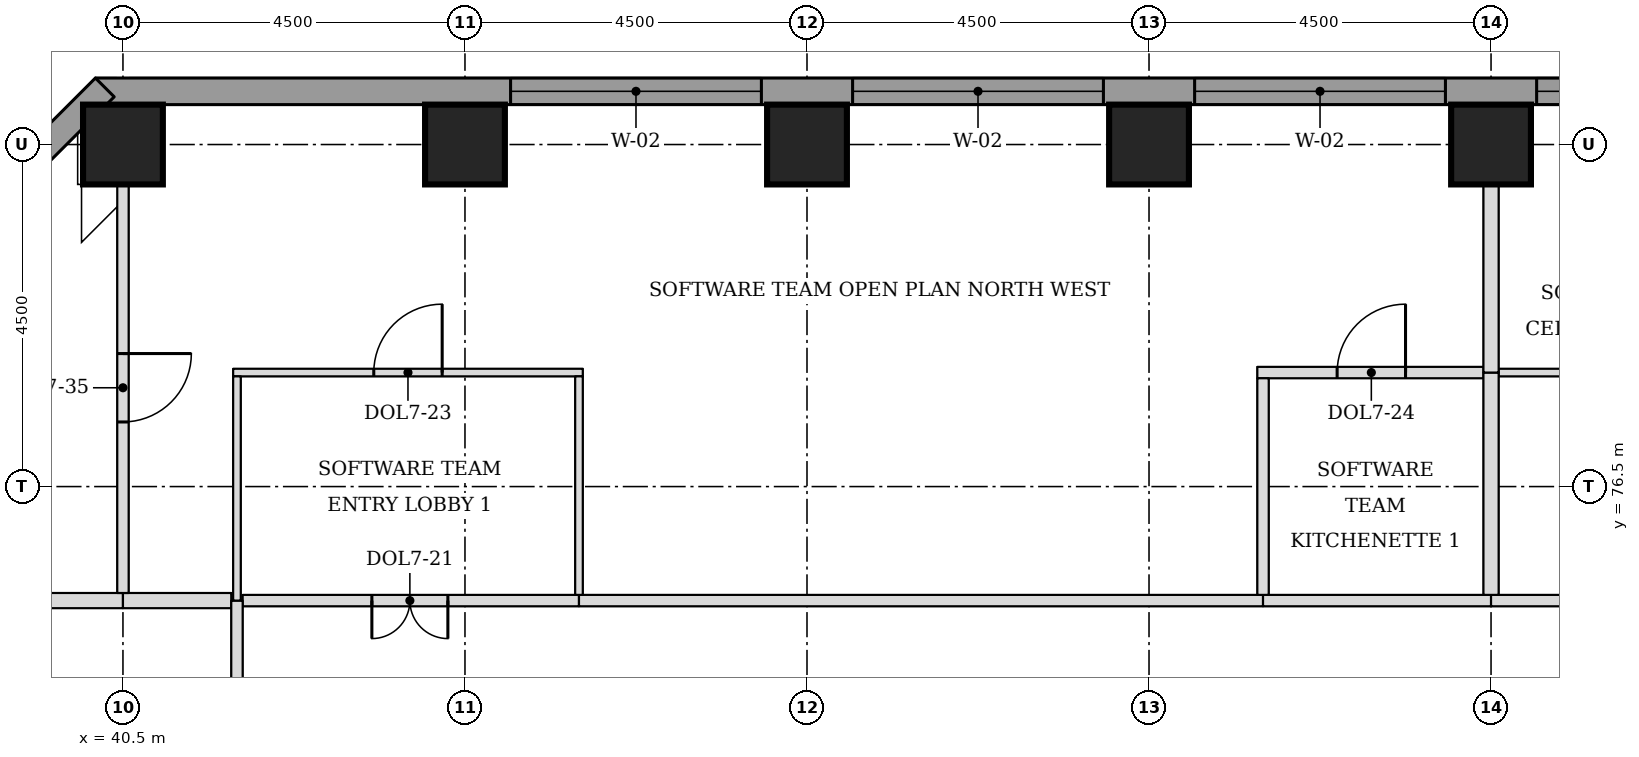
"""IFC4 building model, lengths in metres.
Left out: names, types, materials, properties, quantities, classifications, styles, units other than length and angle.
Written with IfcOpenShell. Run it as: python <this file> out.ifc"""

import sys

from ifc_helpers import new_model, si_unit, direction, frame, frame_2d, origin, origin_2d, place, context, subcontext, project, spatial, rectangle, extrude, element, fill, save


model = new_model("IFC4")
c1 = context("Model", 3, precision=1e-05, world=origin(), true_north=direction((0.0, 1.0)))
c2 = subcontext(c1, "Body", "Model", "MODEL_VIEW")
j1 = project(units=[si_unit("LENGTHUNIT", "METRE"), si_unit("PLANEANGLEUNIT", "RADIAN")], contexts=[c1])
p1 = place(None, origin())
s1 = spatial("IfcSite", under=j1, at=p1, CompositionType="ELEMENT")
p2 = place(p1, origin())
s2 = spatial("IfcBuilding", under=s1, at=p2, CompositionType="ELEMENT")
p3 = place(p2, frame((0.0, 0.0, 127.0)))
s3 = spatial("IfcBuildingStorey", under=s2, at=p3, CompositionType="ELEMENT", Elevation=127.0)
for number, where, z_axis, x_axis in (
    (1, (40.5, 81.0, 0.0), (0.0, 0.0, 1.0), (1.0, 0.0, 0.0)),
    (2, (45.0, 81.0, 0.0), (0.0, 0.0, 1.0), (1.0, 0.0, 0.0)),
    (3, (49.5, 81.0, 0.0), (0.0, 0.0, 1.0), (1.0, 0.0, 0.0)),
    (4, (54.0, 81.0, 0.0), (0.0, 0.0, 1.0), (1.0, 0.0, 0.0)),
    (5, (58.5, 81.0, 0.0), (0.0, 0.0, 1.0), (1.0, 0.0, 0.0)),
):
    element("IfcColumn", number, at=place(p3, frame(where, z_axis=z_axis, x_axis=x_axis)), inside=s3, PredefinedType="COLUMN", context=c2, shape_type="SweptSolid", body=[
        extrude(rectangle(XDim=1.05, YDim=1.05, at=origin_2d()), origin(), (0.0, 0.0, 1.0), 3.7),
    ])
p4 = place(p3, frame((72.362, 81.7, 0.0), z_axis=(0.0, 0.0, 1.0), x_axis=(-1.0, 0.0, 0.0)))
e6 = element("IfcWall", 6, at=p4, inside=s3, PredefinedType="STANDARD", context=c2, shape_type="SweptSolid", body=[
    extrude(rectangle(XDim=32.225, YDim=0.35, at=frame_2d((16.112, 0.0))), origin(), (0.0, 0.0, 1.0), 3.525),
])
p5 = place(p4, frame((5.462, 0.0, 0.9)))
e7 = element("IfcOpeningElement", 7, at=p5, cuts=e6, PredefinedType="OPENING", context=c2, shape_type="SweptSolid", body=[
    extrude(rectangle(XDim=3.3, YDim=1.9, at=frame_2d((1.65, 0.95))), frame((0.0, 0.185, 0.0), z_axis=(0.0, -1.0, 0.0), x_axis=(1.0, 0.0, 0.0)), (0.0, 0.0, 1.0), 0.37),
])
p6 = place(p4, frame((9.962, 0.0, 0.9)))
e8 = element("IfcOpeningElement", 8, at=p6, cuts=e6, PredefinedType="OPENING", context=c2, shape_type="SweptSolid", body=[
    extrude(rectangle(XDim=3.3, YDim=1.9, at=frame_2d((1.65, 0.95))), frame((0.0, 0.185, 0.0), z_axis=(0.0, -1.0, 0.0), x_axis=(1.0, 0.0, 0.0)), (0.0, 0.0, 1.0), 0.37),
])
p7 = place(p4, frame((14.462, 0.0, 0.9)))
e9 = element("IfcOpeningElement", 9, at=p7, cuts=e6, PredefinedType="OPENING", context=c2, shape_type="SweptSolid", body=[
    extrude(rectangle(XDim=3.3, YDim=1.9, at=frame_2d((1.65, 0.95))), frame((0.0, 0.185, 0.0), z_axis=(0.0, -1.0, 0.0), x_axis=(1.0, 0.0, 0.0)), (0.0, 0.0, 1.0), 0.37),
])
p8 = place(p4, frame((18.962, 0.0, 0.9)))
e10 = element("IfcOpeningElement", 10, at=p8, cuts=e6, PredefinedType="OPENING", context=c2, shape_type="SweptSolid", body=[
    extrude(rectangle(XDim=3.3, YDim=1.9, at=frame_2d((1.65, 0.95))), frame((0.0, 0.185, 0.0), z_axis=(0.0, -1.0, 0.0), x_axis=(1.0, 0.0, 0.0)), (0.0, 0.0, 1.0), 0.37),
])
p9 = place(p4, frame((23.462, 0.0, 0.9)))
e11 = element("IfcOpeningElement", 11, at=p9, cuts=e6, PredefinedType="OPENING", context=c2, shape_type="SweptSolid", body=[
    extrude(rectangle(XDim=3.3, YDim=1.9, at=frame_2d((1.65, 0.95))), frame((0.0, 0.185, 0.0), z_axis=(0.0, -1.0, 0.0), x_axis=(1.0, 0.0, 0.0)), (0.0, 0.0, 1.0), 0.37),
])
p10 = place(p3, frame((40.261, 81.751, 0.0), z_axis=(0.0, 0.0, 1.0), x_axis=(-0.707106781187, -0.707106781187, 0.0)))
e12 = element("IfcWall", 12, at=p10, inside=s3, PredefinedType="STANDARD", context=c2, shape_type="SweptSolid", body=[
    extrude(rectangle(XDim=7.089, YDim=0.35, at=frame_2d((3.544, 0.0))), origin(), (0.0, 0.0, 1.0), 3.525),
])
p11 = place(p10, frame((1.894, 0.0, 0.9)))
e13 = element("IfcOpeningElement", 13, at=p11, cuts=e12, PredefinedType="OPENING", context=c2, shape_type="SweptSolid", body=[
    extrude(rectangle(XDim=3.3, YDim=1.9, at=frame_2d((1.65, 0.95))), frame((0.0, 0.185, 0.0), z_axis=(0.0, -1.0, 0.0), x_axis=(1.0, 0.0, 0.0)), (0.0, 0.0, 1.0), 0.37),
])
p12 = place(p3, frame((35.475, 75.0, 0.0), z_axis=(0.0, 0.0, 1.0), x_axis=(1.0, 0.0, 0.0)))
e14 = element("IfcWall", 14, at=p12, inside=s3, PredefinedType="PARTITIONING", context=c2, shape_type="SweptSolid", body=[
    extrude(rectangle(XDim=5.025, YDim=0.2, at=frame_2d((2.512, 0.0))), origin(), (0.0, 0.0, 1.0), 3.55),
])
p13 = place(p3, frame((40.5, 75.0, 0.0), z_axis=(0.0, 0.0, 1.0), x_axis=(1.0, 0.0, 0.0)))
e15 = element("IfcWall", 15, at=p13, inside=s3, PredefinedType="PARTITIONING", context=c2, shape_type="SweptSolid", body=[
    extrude(rectangle(XDim=1.425, YDim=0.2, at=frame_2d((0.712, 0.0))), origin(), (0.0, 0.0, 1.0), 3.55),
])
p14 = place(p3, frame((42.075, 75.0, 0.0), z_axis=(0.0, 0.0, 1.0), x_axis=(1.0, 0.0, 0.0)))
e16 = element("IfcWall", 16, at=p14, inside=s3, PredefinedType="PARTITIONING", context=c2, shape_type="SweptSolid", body=[
    extrude(rectangle(XDim=4.425, YDim=0.15, at=frame_2d((2.212, 0.0))), origin(), (0.0, 0.0, 1.0), 3.55),
])
p15 = place(p14, frame((1.7, 0.0, 0.0)))
e17 = element("IfcOpeningElement", 17, at=p15, cuts=e16, PredefinedType="OPENING", context=c2, shape_type="SweptSolid", body=[
    extrude(rectangle(XDim=1.0, YDim=2.1, at=frame_2d((0.5, 1.05))), frame((0.0, 0.085, 0.0), z_axis=(0.0, -1.0, 0.0), x_axis=(1.0, 0.0, 0.0)), (0.0, 0.0, 1.0), 0.17),
])
p16 = place(p3, frame((46.5, 75.0, 0.0), z_axis=(0.0, 0.0, 1.0), x_axis=(1.0, 0.0, 0.0)))
e18 = element("IfcWall", 18, at=p16, inside=s3, PredefinedType="PARTITIONING", context=c2, shape_type="SweptSolid", body=[
    extrude(rectangle(XDim=9.0, YDim=0.15, at=frame_2d((4.5, 0.0))), origin(), (0.0, 0.0, 1.0), 3.55),
])
p17 = place(p3, frame((55.5, 75.0, 0.0), z_axis=(0.0, 0.0, 1.0), x_axis=(1.0, 0.0, 0.0)))
e19 = element("IfcWall", 19, at=p17, inside=s3, PredefinedType="PARTITIONING", context=c2, shape_type="SweptSolid", body=[
    extrude(rectangle(XDim=3.0, YDim=0.15, at=frame_2d((1.5, 0.0))), origin(), (0.0, 0.0, 1.0), 3.55),
])
p18 = place(p3, frame((58.5, 75.0, 0.0), z_axis=(0.0, 0.0, 1.0), x_axis=(1.0, 0.0, 0.0)))
e20 = element("IfcWall", 20, at=p18, inside=s3, PredefinedType="PARTITIONING", context=c2, shape_type="SweptSolid", body=[
    extrude(rectangle(XDim=12.0, YDim=0.15, at=frame_2d((6.0, 0.0))), origin(), (0.0, 0.0, 1.0), 3.55),
])
p19 = place(p18, frame((5.5, 0.0, 0.0)))
e21 = element("IfcOpeningElement", 21, at=p19, cuts=e20, PredefinedType="OPENING", context=c2, shape_type="SweptSolid", body=[
    extrude(rectangle(XDim=1.0, YDim=2.1, at=frame_2d((0.5, 1.05))), frame((0.0, 0.085, 0.0), z_axis=(0.0, -1.0, 0.0), x_axis=(1.0, 0.0, 0.0)), (0.0, 0.0, 1.0), 0.17),
])
p20 = place(p3, frame((41.95, 78.0, 0.0), z_axis=(0.0, 0.0, 1.0), x_axis=(1.0, 0.0, 0.0)))
e22 = element("IfcWall", 22, at=p20, inside=s3, PredefinedType="PARTITIONING", context=c2, shape_type="SweptSolid", body=[
    extrude(rectangle(XDim=4.6, YDim=0.1, at=frame_2d((2.3, 0.0))), origin(), (0.0, 0.0, 1.0), 3.55),
])
p21 = place(p20, frame((1.85, 0.0, 0.0)))
e23 = element("IfcOpeningElement", 23, at=p21, cuts=e22, PredefinedType="OPENING", context=c2, shape_type="SweptSolid", body=[
    extrude(rectangle(XDim=0.9, YDim=2.1, at=frame_2d((0.45, 1.05))), frame((0.0, 0.06, 0.0), z_axis=(0.0, -1.0, 0.0), x_axis=(1.0, 0.0, 0.0)), (0.0, 0.0, 1.0), 0.12),
])
p22 = place(p3, frame((55.425, 78.0, 0.0), z_axis=(0.0, 0.0, 1.0), x_axis=(1.0, 0.0, 0.0)))
e24 = element("IfcWall", 24, at=p22, inside=s3, PredefinedType="PARTITIONING", context=c2, shape_type="SweptSolid", body=[
    extrude(rectangle(XDim=2.975, YDim=0.15, at=frame_2d((1.487, 0.0))), origin(), (0.0, 0.0, 1.0), 3.55),
])
p23 = place(p22, frame((1.05, 0.0, 0.0)))
e25 = element("IfcOpeningElement", 25, at=p23, cuts=e24, PredefinedType="OPENING", context=c2, shape_type="SweptSolid", body=[
    extrude(rectangle(XDim=0.9, YDim=2.1, at=frame_2d((0.45, 1.05))), frame((0.0, 0.085, 0.0), z_axis=(0.0, -1.0, 0.0), x_axis=(1.0, 0.0, 0.0)), (0.0, 0.0, 1.0), 0.17),
])
p24 = place(p3, frame((58.6, 78.0, 0.0), z_axis=(0.0, 0.0, 1.0), x_axis=(1.0, 0.0, 0.0)))
e26 = element("IfcWall", 26, at=p24, inside=s3, PredefinedType="PARTITIONING", context=c2, shape_type="SweptSolid", body=[
    extrude(rectangle(XDim=4.45, YDim=0.1, at=frame_2d((2.225, 0.0))), origin(), (0.0, 0.0, 1.0), 3.55),
])
p25 = place(p3, frame((42.0, 57.075, 0.0), z_axis=(0.0, 0.0, 1.0), x_axis=(0.0, 1.0, 0.0)))
e27 = element("IfcWall", 27, at=p25, inside=s3, PredefinedType="PARTITIONING", context=c2, shape_type="SweptSolid", body=[
    extrude(rectangle(XDim=17.925, YDim=0.15, at=frame_2d((8.962, 0.0))), origin(), (0.0, 0.0, 1.0), 3.55),
])
p26 = place(p3, frame((42.0, 75.0, 0.0), z_axis=(0.0, 0.0, 1.0), x_axis=(0.0, 1.0, 0.0)))
e28 = element("IfcWall", 28, at=p26, inside=s3, PredefinedType="PARTITIONING", context=c2, shape_type="SweptSolid", body=[
    extrude(rectangle(XDim=2.95, YDim=0.1, at=frame_2d((1.475, 0.0))), origin(), (0.0, 0.0, 1.0), 3.55),
])
p27 = place(p3, frame((46.5, 75.075, 0.0), z_axis=(0.0, 0.0, 1.0), x_axis=(0.0, 1.0, 0.0)))
e29 = element("IfcWall", 29, at=p27, inside=s3, PredefinedType="PARTITIONING", context=c2, shape_type="SweptSolid", body=[
    extrude(rectangle(XDim=2.875, YDim=0.1, at=frame_2d((1.438, 0.0))), origin(), (0.0, 0.0, 1.0), 3.022),
])
p28 = place(p3, frame((55.5, 75.075, 0.0), z_axis=(0.0, 0.0, 1.0), x_axis=(0.0, 1.0, 0.0)))
e30 = element("IfcWall", 30, at=p28, inside=s3, PredefinedType="PARTITIONING", context=c2, shape_type="SweptSolid", body=[
    extrude(rectangle(XDim=2.85, YDim=0.15, at=frame_2d((1.425, 0.0))), origin(), (0.0, 0.0, 1.0), 3.55),
])
p29 = place(p3, frame((58.5, 75.075, 0.0), z_axis=(0.0, 0.0, 1.0), x_axis=(0.0, 1.0, 0.0)))
e31 = element("IfcWall", 31, at=p29, inside=s3, PredefinedType="PARTITIONING", context=c2, shape_type="SweptSolid", body=[
    extrude(rectangle(XDim=2.925, YDim=0.2, at=frame_2d((1.462, 0.0))), origin(), (0.0, 0.0, 1.0), 3.55),
])
p30 = place(p3, frame((40.5, 75.1, 0.0), z_axis=(0.0, 0.0, 1.0), x_axis=(0.0, 1.0, 0.0)))
e32 = element("IfcWall", 32, at=p30, inside=s3, PredefinedType="PARTITIONING", context=c2, shape_type="SweptSolid", body=[
    extrude(rectangle(XDim=5.375, YDim=0.15, at=frame_2d((2.688, 0.0))), origin(), (0.0, 0.0, 1.0), 3.55),
])
p31 = place(p30, frame((2.25, 0.0, 0.0)))
e33 = element("IfcOpeningElement", 33, at=p31, cuts=e32, PredefinedType="OPENING", context=c2, shape_type="SweptSolid", body=[
    extrude(rectangle(XDim=0.9, YDim=2.1, at=frame_2d((0.45, 1.05))), frame((0.0, 0.085, 0.0), z_axis=(0.0, -1.0, 0.0), x_axis=(1.0, 0.0, 0.0)), (0.0, 0.0, 1.0), 0.17),
])
p32 = place(p3, frame((58.5, 78.0, 0.0), z_axis=(0.0, 0.0, 1.0), x_axis=(0.0, 1.0, 0.0)))
e34 = element("IfcWall", 34, at=p32, inside=s3, PredefinedType="PARTITIONING", context=c2, shape_type="SweptSolid", body=[
    extrude(rectangle(XDim=3.525, YDim=0.2, at=frame_2d((1.762, 0.0))), origin(), (0.0, 0.0, 1.0), 3.55),
])
p33 = place(p6, origin())
e35 = element("IfcWindow", 35, at=p33, inside=s3, PartitioningType="SINGLE_PANEL", PredefinedType="WINDOW", context=c2, shape_type="SweptSolid", body=[
    extrude(rectangle(XDim=3.3, YDim=1.9, at=frame_2d((1.65, 0.95))), frame((0.0, 0.085, 0.0), z_axis=(0.0, -1.0, 0.0), x_axis=(1.0, 0.0, 0.0)), (0.0, 0.0, 1.0), 0.06),
])
fill(e8, e35)
p34 = place(p7, origin())
e36 = element("IfcWindow", 36, at=p34, inside=s3, PartitioningType="SINGLE_PANEL", PredefinedType="WINDOW", context=c2, shape_type="SweptSolid", body=[
    extrude(rectangle(XDim=3.3, YDim=1.9, at=frame_2d((1.65, 0.95))), frame((0.0, 0.085, 0.0), z_axis=(0.0, -1.0, 0.0), x_axis=(1.0, 0.0, 0.0)), (0.0, 0.0, 1.0), 0.06),
])
fill(e9, e36)
p35 = place(p8, origin())
e37 = element("IfcWindow", 37, at=p35, inside=s3, PartitioningType="SINGLE_PANEL", PredefinedType="WINDOW", context=c2, shape_type="SweptSolid", body=[
    extrude(rectangle(XDim=3.3, YDim=1.9, at=frame_2d((1.65, 0.95))), frame((0.0, 0.085, 0.0), z_axis=(0.0, -1.0, 0.0), x_axis=(1.0, 0.0, 0.0)), (0.0, 0.0, 1.0), 0.06),
])
fill(e10, e37)
p36 = place(p9, origin())
e38 = element("IfcWindow", 38, at=p36, inside=s3, PartitioningType="SINGLE_PANEL", PredefinedType="WINDOW", context=c2, shape_type="SweptSolid", body=[
    extrude(rectangle(XDim=3.3, YDim=1.9, at=frame_2d((1.65, 0.95))), frame((0.0, 0.085, 0.0), z_axis=(0.0, -1.0, 0.0), x_axis=(1.0, 0.0, 0.0)), (0.0, 0.0, 1.0), 0.06),
])
fill(e11, e38)
p37 = place(p15, frame((1.0, 0.0, 0.0), z_axis=(0.0, 0.0, 1.0), x_axis=(-1.0, 0.0, 0.0)))
e39 = element("IfcDoor", 39, at=p37, inside=s3, OperationType="DOUBLE_DOOR_SINGLE_SWING", PredefinedType="DOOR", context=c2, shape_type="SweptSolid", body=[
    extrude(rectangle(XDim=1.0, YDim=2.1, at=frame_2d((0.5, 1.05))), frame((0.0, 0.025, 0.0), z_axis=(0.0, -1.0, 0.0), x_axis=(1.0, 0.0, 0.0)), (0.0, 0.0, 1.0), 0.05),
])
fill(e17, e39)
p38 = place(p21, origin())
e40 = element("IfcDoor", 40, at=p38, inside=s3, OperationType="SINGLE_SWING_RIGHT", PredefinedType="DOOR", context=c2, shape_type="SweptSolid", body=[
    extrude(rectangle(XDim=0.9, YDim=2.1, at=frame_2d((0.45, 1.05))), frame((0.0, 0.025, 0.0), z_axis=(0.0, -1.0, 0.0), x_axis=(1.0, 0.0, 0.0)), (0.0, 0.0, 1.0), 0.05),
])
fill(e23, e40)
p39 = place(p23, origin())
e41 = element("IfcDoor", 41, at=p39, inside=s3, OperationType="SINGLE_SWING_RIGHT", PredefinedType="DOOR", context=c2, shape_type="SweptSolid", body=[
    extrude(rectangle(XDim=0.9, YDim=2.1, at=frame_2d((0.45, 1.05))), frame((0.0, 0.025, 0.0), z_axis=(0.0, -1.0, 0.0), x_axis=(1.0, 0.0, 0.0)), (0.0, 0.0, 1.0), 0.05),
])
fill(e25, e41)
p40 = place(p31, frame((0.9, 0.0, 0.0), z_axis=(0.0, 0.0, 1.0), x_axis=(-1.0, 0.0, 0.0)))
e42 = element("IfcDoor", 42, at=p40, inside=s3, OperationType="SINGLE_SWING_LEFT", PredefinedType="DOOR", context=c2, shape_type="SweptSolid", body=[
    extrude(rectangle(XDim=0.9, YDim=2.1, at=frame_2d((0.45, 1.05))), frame((0.0, 0.025, 0.0), z_axis=(0.0, -1.0, 0.0), x_axis=(1.0, 0.0, 0.0)), (0.0, 0.0, 1.0), 0.05),
])
fill(e33, e42)
save(model, sys.argv[1])
